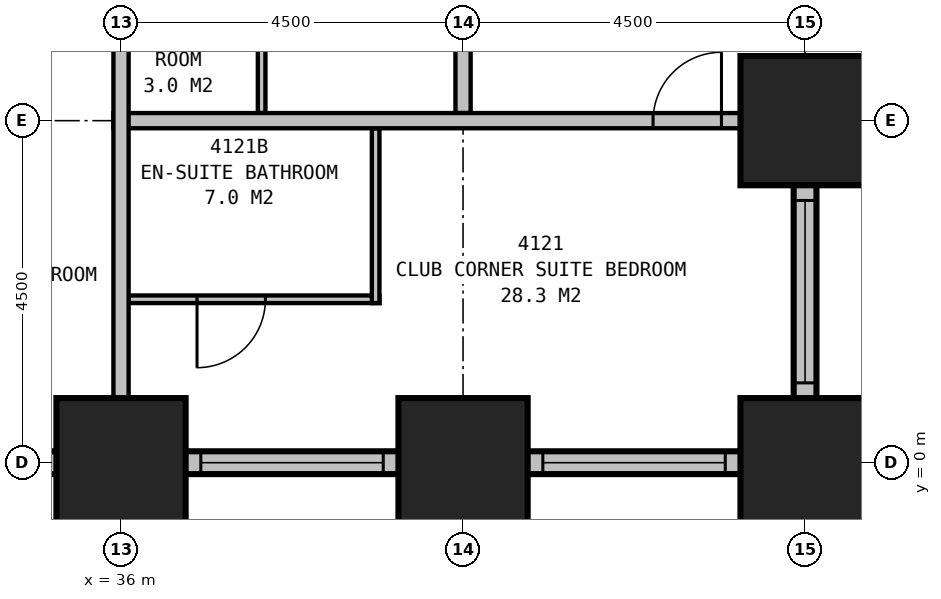
"""IFC4 building model, lengths in metres.
Left out: names, types, materials, properties, quantities, classifications, styles, units other than length and angle.
Written with IfcOpenShell. Run it as: python <this file> out.ifc"""

import sys

from ifc_helpers import new_model, si_unit, direction, frame, frame_2d, origin, origin_2d, place, context, subcontext, project, spatial, rectangle, extrude, element, fill, save


model = new_model("IFC4")
c1 = context("Model", 3, precision=1e-05, world=origin(), true_north=direction((0.0, 1.0)))
c2 = subcontext(c1, "Body", "Model", "MODEL_VIEW")
j1 = project(units=[si_unit("LENGTHUNIT", "METRE"), si_unit("PLANEANGLEUNIT", "RADIAN")], contexts=[c1])
p1 = place(None, origin())
s1 = spatial("IfcSite", under=j1, at=p1, CompositionType="ELEMENT")
p2 = place(p1, origin())
s2 = spatial("IfcBuilding", under=s1, at=p2, CompositionType="ELEMENT")
p3 = place(p2, frame((0.0, 0.0, 162.4)))
s3 = spatial("IfcBuildingStorey", under=s2, at=p3, CompositionType="ELEMENT", Elevation=162.4)
for number, where, z_axis, x_axis in (
    (1, (36.0, 0.0, 0.0), (0.0, 0.0, 1.0), (1.0, 0.0, 0.0)),
    (2, (40.5, 0.0, 0.0), (0.0, 0.0, 1.0), (1.0, 0.0, 0.0)),
    (3, (45.0, 0.0, 0.0), (0.0, 0.0, 1.0), (1.0, 0.0, 0.0)),
    (4, (45.0, 4.5, 0.0), (0.0, 0.0, 1.0), (1.0, 0.0, 0.0)),
):
    element("IfcColumn", number, at=place(p3, frame(where, z_axis=z_axis, x_axis=x_axis)), inside=s3, PredefinedType="COLUMN", context=c2, shape_type="SweptSolid", body=[
        extrude(rectangle(XDim=1.7, YDim=1.7, at=origin_2d()), origin(), (0.0, 0.0, 1.0), 3.5),
    ])
p4 = place(p3, frame((8.85, 0.0, 0.0), z_axis=(0.0, 0.0, 1.0), x_axis=(1.0, 0.0, 0.0)))
e5 = element("IfcWall", 5, at=p4, inside=s3, PredefinedType="STANDARD", context=c2, shape_type="SweptSolid", body=[
    extrude(rectangle(XDim=36.3, YDim=0.3, at=frame_2d((18.15, 0.0))), origin(), (0.0, 0.0, 1.0), 2.25),
])
p5 = place(p4, frame((1.65, 0.0, 0.5)))
e6 = element("IfcOpeningElement", 6, at=p5, cuts=e5, PredefinedType="OPENING", context=c2, shape_type="SweptSolid", body=[
    extrude(rectangle(XDim=1.5, YDim=1.6, at=frame_2d((0.75, 0.8))), frame((0.0, 0.16, 0.0), z_axis=(0.0, -1.0, 0.0), x_axis=(1.0, 0.0, 0.0)), (0.0, 0.0, 1.0), 0.32),
])
p6 = place(p4, frame((5.7, 0.0, 0.5)))
e7 = element("IfcOpeningElement", 7, at=p6, cuts=e5, PredefinedType="OPENING", context=c2, shape_type="SweptSolid", body=[
    extrude(rectangle(XDim=2.4, YDim=1.6, at=frame_2d((1.2, 0.8))), frame((0.0, 0.16, 0.0), z_axis=(0.0, -1.0, 0.0), x_axis=(1.0, 0.0, 0.0)), (0.0, 0.0, 1.0), 0.32),
])
p7 = place(p4, frame((10.2, 0.0, 0.5)))
e8 = element("IfcOpeningElement", 8, at=p7, cuts=e5, PredefinedType="OPENING", context=c2, shape_type="SweptSolid", body=[
    extrude(rectangle(XDim=2.4, YDim=1.6, at=frame_2d((1.2, 0.8))), frame((0.0, 0.16, 0.0), z_axis=(0.0, -1.0, 0.0), x_axis=(1.0, 0.0, 0.0)), (0.0, 0.0, 1.0), 0.32),
])
p8 = place(p4, frame((14.7, 0.0, 0.5)))
e9 = element("IfcOpeningElement", 9, at=p8, cuts=e5, PredefinedType="OPENING", context=c2, shape_type="SweptSolid", body=[
    extrude(rectangle(XDim=2.4, YDim=1.6, at=frame_2d((1.2, 0.8))), frame((0.0, 0.16, 0.0), z_axis=(0.0, -1.0, 0.0), x_axis=(1.0, 0.0, 0.0)), (0.0, 0.0, 1.0), 0.32),
])
p9 = place(p4, frame((19.2, 0.0, 0.5)))
e10 = element("IfcOpeningElement", 10, at=p9, cuts=e5, PredefinedType="OPENING", context=c2, shape_type="SweptSolid", body=[
    extrude(rectangle(XDim=2.4, YDim=1.6, at=frame_2d((1.2, 0.8))), frame((0.0, 0.16, 0.0), z_axis=(0.0, -1.0, 0.0), x_axis=(1.0, 0.0, 0.0)), (0.0, 0.0, 1.0), 0.32),
])
p10 = place(p4, frame((23.7, 0.0, 0.5)))
e11 = element("IfcOpeningElement", 11, at=p10, cuts=e5, PredefinedType="OPENING", context=c2, shape_type="SweptSolid", body=[
    extrude(rectangle(XDim=2.4, YDim=1.6, at=frame_2d((1.2, 0.8))), frame((0.0, 0.16, 0.0), z_axis=(0.0, -1.0, 0.0), x_axis=(1.0, 0.0, 0.0)), (0.0, 0.0, 1.0), 0.32),
])
p11 = place(p4, frame((28.2, 0.0, 0.5)))
e12 = element("IfcOpeningElement", 12, at=p11, cuts=e5, PredefinedType="OPENING", context=c2, shape_type="SweptSolid", body=[
    extrude(rectangle(XDim=2.4, YDim=1.6, at=frame_2d((1.2, 0.8))), frame((0.0, 0.16, 0.0), z_axis=(0.0, -1.0, 0.0), x_axis=(1.0, 0.0, 0.0)), (0.0, 0.0, 1.0), 0.32),
])
p12 = place(p4, frame((32.7, 0.0, 0.5)))
e13 = element("IfcOpeningElement", 13, at=p12, cuts=e5, PredefinedType="OPENING", context=c2, shape_type="SweptSolid", body=[
    extrude(rectangle(XDim=2.4, YDim=1.6, at=frame_2d((1.2, 0.8))), frame((0.0, 0.16, 0.0), z_axis=(0.0, -1.0, 0.0), x_axis=(1.0, 0.0, 0.0)), (0.0, 0.0, 1.0), 0.32),
])
p13 = place(p3, frame((45.0, -0.15, 0.0), z_axis=(0.0, 0.0, 1.0), x_axis=(0.0, 1.0, 0.0)))
e14 = element("IfcWall", 14, at=p13, inside=s3, PredefinedType="STANDARD", context=c2, shape_type="SweptSolid", body=[
    extrude(rectangle(XDim=4.8, YDim=0.3, at=frame_2d((2.4, 0.0))), origin(), (0.0, 0.0, 1.0), 2.25),
])
p14 = place(p13, frame((1.2, 0.0, 0.5)))
e15 = element("IfcOpeningElement", 15, at=p14, cuts=e14, PredefinedType="OPENING", context=c2, shape_type="SweptSolid", body=[
    extrude(rectangle(XDim=2.4, YDim=1.6, at=frame_2d((1.2, 0.8))), frame((0.0, 0.16, 0.0), z_axis=(0.0, -1.0, 0.0), x_axis=(1.0, 0.0, 0.0)), (0.0, 0.0, 1.0), 0.32),
])
p15 = place(p3, frame((44.85, 4.5, 0.0), z_axis=(0.0, 0.0, 1.0), x_axis=(1.0, 0.0, 0.0)))
e16 = element("IfcWall", 16, at=p15, inside=s3, PredefinedType="STANDARD", context=c2, shape_type="SweptSolid", body=[
    extrude(rectangle(XDim=4.3, YDim=0.3, at=frame_2d((2.15, 0.0))), origin(), (0.0, 0.0, 1.0), 2.25),
])
p16 = place(p15, frame((1.4, 0.0, 0.5)))
e17 = element("IfcOpeningElement", 17, at=p16, cuts=e16, PredefinedType="OPENING", context=c2, shape_type="SweptSolid", body=[
    extrude(rectangle(XDim=1.5, YDim=1.6, at=frame_2d((0.75, 0.8))), frame((0.0, 0.16, 0.0), z_axis=(0.0, -1.0, 0.0), x_axis=(1.0, 0.0, 0.0)), (0.0, 0.0, 1.0), 0.32),
])
p17 = place(p3, frame((49.017, 4.351, 0.0), z_axis=(0.0, 0.0, 1.0), x_axis=(-0.110433201132, 0.993883548555, 0.0)))
e18 = element("IfcWall", 18, at=p17, inside=s3, PredefinedType="STANDARD", context=c2, shape_type="SweptSolid", body=[
    extrude(rectangle(XDim=31.994, YDim=0.3, at=frame_2d((15.997, 0.0))), origin(), (0.0, 0.0, 1.0), 2.25),
])
p18 = place(p17, frame((1.664, 0.0, 0.5)))
e19 = element("IfcOpeningElement", 19, at=p18, cuts=e18, PredefinedType="OPENING", context=c2, shape_type="SweptSolid", body=[
    extrude(rectangle(XDim=1.5, YDim=1.6, at=frame_2d((0.75, 0.8))), frame((0.0, 0.16, 0.0), z_axis=(0.0, -1.0, 0.0), x_axis=(1.0, 0.0, 0.0)), (0.0, 0.0, 1.0), 0.32),
])
p19 = place(p17, frame((6.192, 0.0, 0.5)))
e20 = element("IfcOpeningElement", 20, at=p19, cuts=e18, PredefinedType="OPENING", context=c2, shape_type="SweptSolid", body=[
    extrude(rectangle(XDim=1.5, YDim=1.6, at=frame_2d((0.75, 0.8))), frame((0.0, 0.16, 0.0), z_axis=(0.0, -1.0, 0.0), x_axis=(1.0, 0.0, 0.0)), (0.0, 0.0, 1.0), 0.32),
])
p20 = place(p17, frame((10.719, 0.0, 0.5)))
e21 = element("IfcOpeningElement", 21, at=p20, cuts=e18, PredefinedType="OPENING", context=c2, shape_type="SweptSolid", body=[
    extrude(rectangle(XDim=1.5, YDim=1.6, at=frame_2d((0.75, 0.8))), frame((0.0, 0.16, 0.0), z_axis=(0.0, -1.0, 0.0), x_axis=(1.0, 0.0, 0.0)), (0.0, 0.0, 1.0), 0.32),
])
p21 = place(p17, frame((15.247, 0.0, 0.5)))
e22 = element("IfcOpeningElement", 22, at=p21, cuts=e18, PredefinedType="OPENING", context=c2, shape_type="SweptSolid", body=[
    extrude(rectangle(XDim=1.5, YDim=1.6, at=frame_2d((0.75, 0.8))), frame((0.0, 0.16, 0.0), z_axis=(0.0, -1.0, 0.0), x_axis=(1.0, 0.0, 0.0)), (0.0, 0.0, 1.0), 0.32),
])
p22 = place(p17, frame((19.775, 0.0, 0.5)))
e23 = element("IfcOpeningElement", 23, at=p22, cuts=e18, PredefinedType="OPENING", context=c2, shape_type="SweptSolid", body=[
    extrude(rectangle(XDim=1.5, YDim=1.6, at=frame_2d((0.75, 0.8))), frame((0.0, 0.16, 0.0), z_axis=(0.0, -1.0, 0.0), x_axis=(1.0, 0.0, 0.0)), (0.0, 0.0, 1.0), 0.32),
])
p23 = place(p17, frame((24.302, 0.0, 0.5)))
e24 = element("IfcOpeningElement", 24, at=p23, cuts=e18, PredefinedType="OPENING", context=c2, shape_type="SweptSolid", body=[
    extrude(rectangle(XDim=1.5, YDim=1.6, at=frame_2d((0.75, 0.8))), frame((0.0, 0.16, 0.0), z_axis=(0.0, -1.0, 0.0), x_axis=(1.0, 0.0, 0.0)), (0.0, 0.0, 1.0), 0.32),
])
p24 = place(p17, frame((28.83, 0.0, 0.5)))
e25 = element("IfcOpeningElement", 25, at=p24, cuts=e18, PredefinedType="OPENING", context=c2, shape_type="SweptSolid", body=[
    extrude(rectangle(XDim=1.5, YDim=1.6, at=frame_2d((0.75, 0.8))), frame((0.0, 0.16, 0.0), z_axis=(0.0, -1.0, 0.0), x_axis=(1.0, 0.0, 0.0)), (0.0, 0.0, 1.0), 0.32),
])
p25 = place(p3, frame((36.0, 10.6, 0.0), z_axis=(0.0, 0.0, 1.0), x_axis=(0.0, -1.0, 0.0)))
e26 = element("IfcWall", 26, at=p25, inside=s3, PredefinedType="PARTITIONING", context=c2, shape_type="SweptSolid", body=[
    extrude(rectangle(XDim=10.6, YDim=0.2, at=frame_2d((5.3, 0.0))), origin(), (0.0, 0.0, 1.0), 2.25),
])
p26 = place(p3, frame((35.9, 4.5, 0.0), z_axis=(0.0, 0.0, 1.0), x_axis=(1.0, 0.0, 0.0)))
e27 = element("IfcWall", 27, at=p26, inside=s3, PredefinedType="PARTITIONING", context=c2, shape_type="SweptSolid", body=[
    extrude(rectangle(XDim=9.1, YDim=0.2, at=frame_2d((4.55, 0.0))), origin(), (0.0, 0.0, 1.0), 3.25),
])
p27 = place(p26, frame((7.1, 0.0, 0.0)))
e28 = element("IfcOpeningElement", 28, at=p27, cuts=e27, PredefinedType="OPENING", context=c2, shape_type="SweptSolid", body=[
    extrude(rectangle(XDim=0.9, YDim=2.1, at=frame_2d((0.45, 1.05))), frame((0.0, 0.11, 0.0), z_axis=(0.0, -1.0, 0.0), x_axis=(1.0, 0.0, 0.0)), (0.0, 0.0, 1.0), 0.22),
])
p28 = place(p3, frame((40.5, 4.6, 0.0), z_axis=(0.0, 0.0, 1.0), x_axis=(0.0, 1.0, 0.0)))
e29 = element("IfcWall", 29, at=p28, inside=s3, PredefinedType="PARTITIONING", context=c2, shape_type="SweptSolid", body=[
    extrude(rectangle(XDim=8.8, YDim=0.2, at=frame_2d((4.4, 0.0))), origin(), (0.0, 0.0, 1.0), 2.25),
])
p29 = place(p28, frame((4.05, 0.0, 0.0)))
e30 = element("IfcOpeningElement", 30, at=p29, cuts=e29, PredefinedType="OPENING", context=c2, shape_type="SweptSolid", body=[
    extrude(rectangle(XDim=0.9, YDim=2.1, at=frame_2d((0.45, 1.05))), frame((0.0, 0.11, 0.0), z_axis=(0.0, -1.0, 0.0), x_axis=(1.0, 0.0, 0.0)), (0.0, 0.0, 1.0), 0.22),
])
p30 = place(p3, frame((37.85, 4.6, 0.0), z_axis=(0.0, 0.0, 1.0), x_axis=(0.0, 1.0, 0.0)))
e31 = element("IfcWall", 31, at=p30, inside=s3, PredefinedType="PLUMBINGWALL", context=c2, shape_type="SweptSolid", body=[
    extrude(rectangle(XDim=2.0, YDim=0.1, at=frame_2d((1.0, 0.0))), origin(), (0.0, 0.0, 1.0), 3.25),
])
p31 = place(p3, frame((39.35, 4.4, 0.0), z_axis=(0.0, 0.0, 1.0), x_axis=(0.0, -1.0, 0.0)))
e32 = element("IfcWall", 32, at=p31, inside=s3, PredefinedType="PLUMBINGWALL", context=c2, shape_type="SweptSolid", body=[
    extrude(rectangle(XDim=2.3, YDim=0.1, at=frame_2d((1.15, 0.0))), origin(), (0.0, 0.0, 1.0), 3.25),
])
p32 = place(p3, frame((36.1, 2.15, 0.0), z_axis=(0.0, 0.0, 1.0), x_axis=(1.0, 0.0, 0.0)))
e33 = element("IfcWall", 33, at=p32, inside=s3, PredefinedType="PLUMBINGWALL", context=c2, shape_type="SweptSolid", body=[
    extrude(rectangle(XDim=3.3, YDim=0.1, at=frame_2d((1.65, 0.0))), origin(), (0.0, 0.0, 1.0), 3.25),
])
p33 = place(p32, frame((1.8, 0.0, 0.0), z_axis=(0.0, 0.0, 1.0), x_axis=(-1.0, 0.0, 0.0)))
e34 = element("IfcOpeningElement", 34, at=p33, cuts=e33, PredefinedType="OPENING", context=c2, shape_type="SweptSolid", body=[
    extrude(rectangle(XDim=0.9, YDim=2.1, at=frame_2d((0.45, 1.05))), frame((0.0, 0.06, 0.0), z_axis=(0.0, -1.0, 0.0), x_axis=(1.0, 0.0, 0.0)), (0.0, 0.0, 1.0), 0.12),
])
p34 = place(p11, origin())
e35 = element("IfcWindow", 35, at=p34, inside=s3, PartitioningType="SINGLE_PANEL", PredefinedType="WINDOW", context=c2, shape_type="SweptSolid", body=[
    extrude(rectangle(XDim=2.4, YDim=1.6, at=frame_2d((1.2, 0.8))), frame((0.0, 0.03, 0.0), z_axis=(0.0, -1.0, 0.0), x_axis=(1.0, 0.0, 0.0)), (0.0, 0.0, 1.0), 0.06),
])
fill(e12, e35)
p35 = place(p12, origin())
e36 = element("IfcWindow", 36, at=p35, inside=s3, PartitioningType="SINGLE_PANEL", PredefinedType="WINDOW", context=c2, shape_type="SweptSolid", body=[
    extrude(rectangle(XDim=2.4, YDim=1.6, at=frame_2d((1.2, 0.8))), frame((0.0, 0.03, 0.0), z_axis=(0.0, -1.0, 0.0), x_axis=(1.0, 0.0, 0.0)), (0.0, 0.0, 1.0), 0.06),
])
fill(e13, e36)
p36 = place(p14, origin())
e37 = element("IfcWindow", 37, at=p36, inside=s3, PartitioningType="SINGLE_PANEL", PredefinedType="WINDOW", context=c2, shape_type="SweptSolid", body=[
    extrude(rectangle(XDim=2.4, YDim=1.6, at=frame_2d((1.2, 0.8))), frame((0.0, 0.03, 0.0), z_axis=(0.0, -1.0, 0.0), x_axis=(1.0, 0.0, 0.0)), (0.0, 0.0, 1.0), 0.06),
])
fill(e15, e37)
p37 = place(p27, origin())
e38 = element("IfcDoor", 38, at=p37, inside=s3, OperationType="SINGLE_SWING_RIGHT", PredefinedType="DOOR", context=c2, shape_type="SweptSolid", body=[
    extrude(rectangle(XDim=0.9, YDim=2.1, at=frame_2d((0.45, 1.05))), frame((0.0, 0.025, 0.0), z_axis=(0.0, -1.0, 0.0), x_axis=(1.0, 0.0, 0.0)), (0.0, 0.0, 1.0), 0.05),
])
fill(e28, e38)
p38 = place(p33, origin())
e39 = element("IfcDoor", 39, at=p38, inside=s3, OperationType="SINGLE_SWING_RIGHT", PredefinedType="DOOR", context=c2, shape_type="SweptSolid", body=[
    extrude(rectangle(XDim=0.9, YDim=2.1, at=frame_2d((0.45, 1.05))), frame((0.0, 0.025, 0.0), z_axis=(0.0, -1.0, 0.0), x_axis=(1.0, 0.0, 0.0)), (0.0, 0.0, 1.0), 0.05),
])
fill(e34, e39)
save(model, sys.argv[1])
